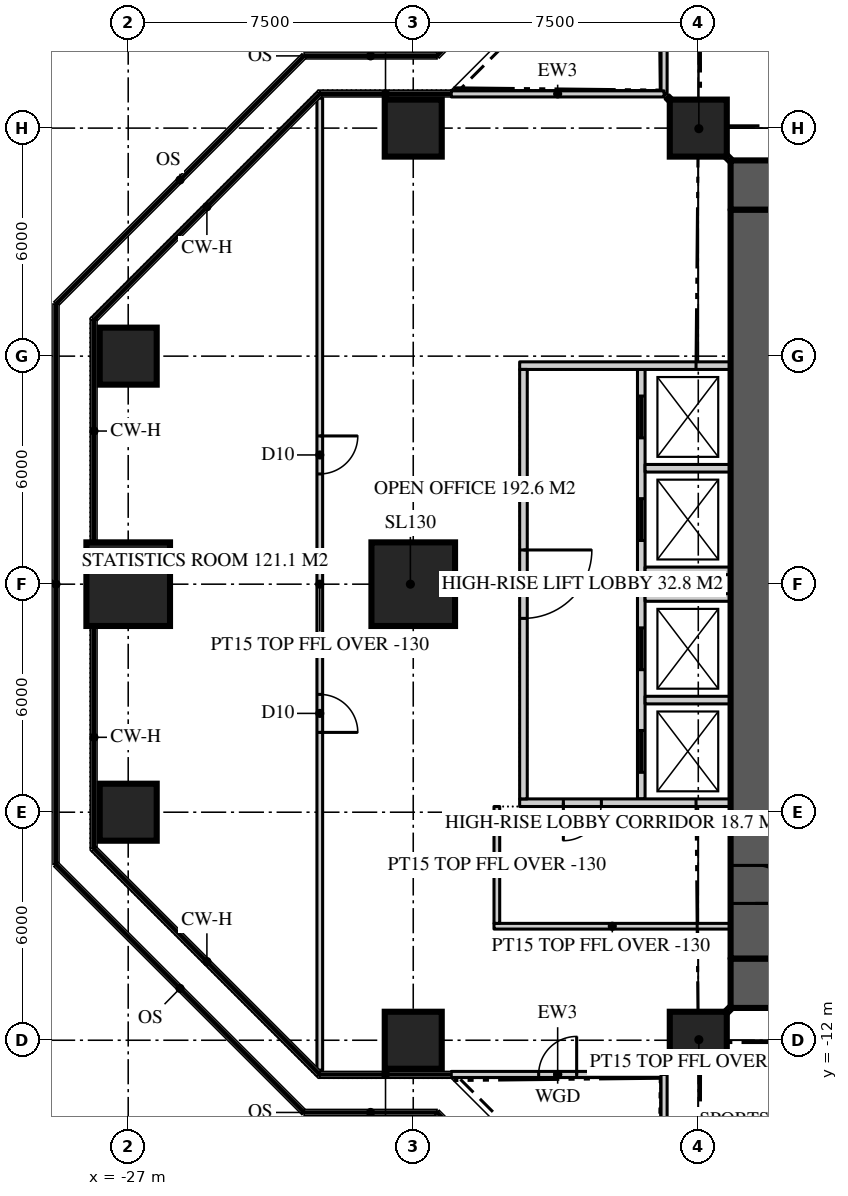
"""IFC4 building model, lengths in metres.
Left out: names, types, materials, properties, quantities, classifications, styles, units other than length and angle.
Written with IfcOpenShell. Run it as: python <this file> out.ifc"""

import sys

from ifc_helpers import new_model, si_unit, direction, frame, frame_2d, origin, origin_2d, place, context, subcontext, project, spatial, rectangle, extrude, element, fill, save


model = new_model("IFC4")
c1 = context("Model", 3, precision=1e-05, world=origin(), true_north=direction((0.0, 1.0)))
c2 = subcontext(c1, "Body", "Model", "MODEL_VIEW")
j1 = project(units=[si_unit("LENGTHUNIT", "METRE"), si_unit("PLANEANGLEUNIT", "RADIAN")], contexts=[c1])
p1 = place(None, origin())
s1 = spatial("IfcSite", under=j1, at=p1, CompositionType="ELEMENT")
p2 = place(p1, origin())
s2 = spatial("IfcBuilding", under=s1, at=p2, CompositionType="ELEMENT")
p3 = place(p2, frame((0.0, 0.0, 220.5)))
s3 = spatial("IfcBuildingStorey", under=s2, at=p3, CompositionType="ELEMENT", Elevation=220.5)
p4 = place(p3, frame((-11.15, 10.5, 0.0), z_axis=(0.0, 0.0, 1.0), x_axis=(1.0, 0.0, 0.0)))
e1 = element("IfcWall", 1, at=p4, inside=s3, PredefinedType="SHEAR", context=c2, shape_type="SweptSolid", body=[
    extrude(rectangle(XDim=22.3, YDim=1.3, at=frame_2d((11.15, 0.0))), origin(), (0.0, 0.0, 1.0), 3.9),
])
p5 = place(p4, frame((4.25, 0.0, 0.0)))
e2 = element("IfcOpeningElement", 2, at=p5, cuts=e1, PredefinedType="OPENING", context=c2, shape_type="SweptSolid", body=[
    extrude(rectangle(XDim=1.8, YDim=2.2, at=frame_2d((0.9, 1.1))), frame((0.0, 0.66, 0.0), z_axis=(0.0, -1.0, 0.0), x_axis=(1.0, 0.0, 0.0)), (0.0, 0.0, 1.0), 1.32),
])
p6 = place(p4, frame((16.25, 0.0, 0.0)))
e3 = element("IfcOpeningElement", 3, at=p6, cuts=e1, PredefinedType="OPENING", context=c2, shape_type="SweptSolid", body=[
    extrude(rectangle(XDim=1.8, YDim=2.2, at=frame_2d((0.9, 1.1))), frame((0.0, 0.66, 0.0), z_axis=(0.0, -1.0, 0.0), x_axis=(1.0, 0.0, 0.0)), (0.0, 0.0, 1.0), 1.32),
])
p7 = place(p3, frame((11.15, -10.5, 0.0), z_axis=(0.0, 0.0, 1.0), x_axis=(-1.0, 0.0, 0.0)))
e4 = element("IfcWall", 4, at=p7, inside=s3, PredefinedType="SHEAR", context=c2, shape_type="SweptSolid", body=[
    extrude(rectangle(XDim=22.3, YDim=1.3, at=frame_2d((11.15, 0.0))), origin(), (0.0, 0.0, 1.0), 3.9),
])
p8 = place(p7, frame((16.25, 0.0, 0.0)))
e5 = element("IfcOpeningElement", 5, at=p8, cuts=e4, PredefinedType="OPENING", context=c2, shape_type="SweptSolid", body=[
    extrude(rectangle(XDim=1.8, YDim=2.2, at=frame_2d((0.9, 1.1))), frame((0.0, 0.66, 0.0), z_axis=(0.0, -1.0, 0.0), x_axis=(1.0, 0.0, 0.0)), (0.0, 0.0, 1.0), 1.32),
])
p9 = place(p7, frame((4.25, 0.0, 0.0)))
e6 = element("IfcOpeningElement", 6, at=p9, cuts=e4, PredefinedType="OPENING", context=c2, shape_type="SweptSolid", body=[
    extrude(rectangle(XDim=1.8, YDim=2.2, at=frame_2d((0.9, 1.1))), frame((0.0, 0.66, 0.0), z_axis=(0.0, -1.0, 0.0), x_axis=(1.0, 0.0, 0.0)), (0.0, 0.0, 1.0), 1.32),
])
p10 = place(p3, frame((-10.5, 9.85, 0.0), z_axis=(0.0, 0.0, 1.0), x_axis=(0.0, -1.0, 0.0)))
e7 = element("IfcWall", 7, at=p10, inside=s3, PredefinedType="SHEAR", context=c2, shape_type="SweptSolid", body=[
    extrude(rectangle(XDim=19.7, YDim=1.3, at=frame_2d((9.85, 0.0))), origin(), (0.0, 0.0, 1.0), 3.9),
])
p11 = place(p10, frame((17.25, 0.0, 0.0)))
e8 = element("IfcOpeningElement", 8, at=p11, cuts=e7, PredefinedType="OPENING", context=c2, shape_type="SweptSolid", body=[
    extrude(rectangle(XDim=1.0, YDim=2.2, at=frame_2d((0.5, 1.1))), frame((0.0, 0.66, 0.0), z_axis=(0.0, -1.0, 0.0), x_axis=(1.0, 0.0, 0.0)), (0.0, 0.0, 1.0), 1.32),
])
for number, where, z_axis, x_axis in (
    (9, (-19.5, -12.0, 0.0), (0.0, 0.0, 1.0), (1.0, 0.0, 0.0)),
    (10, (-12.0, -12.0, 0.0), (0.0, 0.0, 1.0), (1.0, 0.0, 0.0)),
    (11, (-27.0, -6.0, 0.0), (0.0, 0.0, 1.0), (1.0, 0.0, 0.0)),
):
    element("IfcColumn", number, at=place(p3, frame(where, z_axis=z_axis, x_axis=x_axis)), inside=s3, PredefinedType="COLUMN", context=c2, shape_type="SweptSolid", body=[
        extrude(rectangle(XDim=1.5, YDim=1.5, at=origin_2d()), origin(), (0.0, 0.0, 1.0), 3.9),
    ])
for number, where, z_axis, x_axis in (
    (12, (-27.0, 0.0, 0.0), (0.0, 0.0, 1.0), (1.0, 0.0, 0.0)),
    (13, (-19.5, 0.0, 0.0), (0.0, 0.0, 1.0), (1.0, 0.0, 0.0)),
):
    element("IfcColumn", number, at=place(p3, frame(where, z_axis=z_axis, x_axis=x_axis)), inside=s3, PredefinedType="COLUMN", context=c2, shape_type="SweptSolid", body=[
        extrude(rectangle(XDim=2.2, YDim=2.2, at=origin_2d()), origin(), (0.0, 0.0, 1.0), 3.9),
    ])
for number, where, z_axis, x_axis in (
    (14, (-27.0, 6.0, 0.0), (0.0, 0.0, 1.0), (1.0, 0.0, 0.0)),
    (15, (-19.5, 12.0, 0.0), (0.0, 0.0, 1.0), (1.0, 0.0, 0.0)),
    (16, (-12.0, 12.0, 0.0), (0.0, 0.0, 1.0), (1.0, 0.0, 0.0)),
):
    element("IfcColumn", number, at=place(p3, frame(where, z_axis=z_axis, x_axis=x_axis)), inside=s3, PredefinedType="COLUMN", context=c2, shape_type="SweptSolid", body=[
        extrude(rectangle(XDim=1.5, YDim=1.5, at=origin_2d()), origin(), (0.0, 0.0, 1.0), 3.9),
    ])
p12 = place(p3, frame((-12.9, 18.5, 0.0), z_axis=(0.0, 0.0, 1.0), x_axis=(0.0, -1.0, 0.0)))
e17 = element("IfcWall", 17, at=p12, inside=s3, PredefinedType="SOLIDWALL", context=c2, shape_type="SweptSolid", body=[
    extrude(rectangle(XDim=5.6, YDim=0.16, at=frame_2d((2.8, 0.0))), origin(), (0.0, 0.0, 1.0), 3.77),
])
p13 = place(p12, frame((2.3, 0.0, 0.0)))
e18 = element("IfcOpeningElement", 18, at=p13, cuts=e17, PredefinedType="OPENING", context=c2, shape_type="SweptSolid", body=[
    extrude(rectangle(XDim=1.0, YDim=2.2, at=frame_2d((0.5, 1.1))), frame((0.0, 0.09, 0.0), z_axis=(0.0, -1.0, 0.0), x_axis=(1.0, 0.0, 0.0)), (0.0, 0.0, 1.0), 0.18),
])
p14 = place(p3, frame((-12.9, 12.9, 0.0), z_axis=(0.0, 0.0, 1.0), x_axis=(-1.0, 0.0, 0.0)))
e19 = element("IfcWall", 19, at=p14, inside=s3, PredefinedType="SOLIDWALL", context=c2, shape_type="SweptSolid", body=[
    extrude(rectangle(XDim=5.6, YDim=0.16, at=frame_2d((2.8, 0.0))), origin(), (0.0, 0.0, 1.0), 3.77),
])
p15 = place(p3, frame((-18.5, -12.9, 0.0), z_axis=(0.0, 0.0, 1.0), x_axis=(1.0, 0.0, 0.0)))
e20 = element("IfcWall", 20, at=p15, inside=s3, PredefinedType="SOLIDWALL", context=c2, shape_type="SweptSolid", body=[
    extrude(rectangle(XDim=5.6, YDim=0.16, at=frame_2d((2.8, 0.0))), origin(), (0.0, 0.0, 1.0), 3.77),
])
p16 = place(p15, frame((2.3, 0.0, 0.0)))
e21 = element("IfcOpeningElement", 21, at=p16, cuts=e20, PredefinedType="OPENING", context=c2, shape_type="SweptSolid", body=[
    extrude(rectangle(XDim=1.0, YDim=2.2, at=frame_2d((0.5, 1.1))), frame((0.0, 0.09, 0.0), z_axis=(0.0, -1.0, 0.0), x_axis=(1.0, 0.0, 0.0)), (0.0, 0.0, 1.0), 0.18),
])
p17 = place(p3, frame((-12.9, -12.9, 0.0), z_axis=(0.0, 0.0, 1.0), x_axis=(0.0, -1.0, 0.0)))
e22 = element("IfcWall", 22, at=p17, inside=s3, PredefinedType="SOLIDWALL", context=c2, shape_type="SweptSolid", body=[
    extrude(rectangle(XDim=5.6, YDim=0.16, at=frame_2d((2.8, 0.0))), origin(), (0.0, 0.0, 1.0), 3.77),
])
p18 = place(p3, frame((-21.959, 12.786, 0.0), z_axis=(0.0, 0.0, 1.0), x_axis=(0.0, -1.0, 0.0)))
e23 = element("IfcWall", 23, at=p18, inside=s3, PredefinedType="PARTITIONING", context=c2, shape_type="SweptSolid", body=[
    extrude(rectangle(XDim=25.573, YDim=0.15, at=frame_2d((12.786, 0.0))), origin(), (0.0, 0.0, 1.0), 3.77),
])
p19 = place(p18, frame((15.687, 0.0, 0.0)))
e24 = element("IfcOpeningElement", 24, at=p19, cuts=e23, PredefinedType="OPENING", context=c2, shape_type="SweptSolid", body=[
    extrude(rectangle(XDim=1.0, YDim=2.2, at=frame_2d((0.5, 1.1))), frame((0.0, 0.085, 0.0), z_axis=(0.0, -1.0, 0.0), x_axis=(1.0, 0.0, 0.0)), (0.0, 0.0, 1.0), 0.17),
])
p20 = place(p18, frame((8.886, 0.0, 0.0)))
e25 = element("IfcOpeningElement", 25, at=p20, cuts=e23, PredefinedType="OPENING", context=c2, shape_type="SweptSolid", body=[
    extrude(rectangle(XDim=1.0, YDim=2.2, at=frame_2d((0.5, 1.1))), frame((0.0, 0.085, 0.0), z_axis=(0.0, -1.0, 0.0), x_axis=(1.0, 0.0, 0.0)), (0.0, 0.0, 1.0), 0.17),
])
p21 = place(p3, frame((-13.5, 5.65, 0.0), z_axis=(0.0, 0.0, 1.0), x_axis=(0.0, -1.0, 0.0)))
e26 = element("IfcWall", 26, at=p21, inside=s3, PredefinedType="SOLIDWALL", context=c2, shape_type="SweptSolid", body=[
    extrude(rectangle(XDim=11.3, YDim=0.2, at=frame_2d((5.65, 0.0))), origin(), (0.0, 0.0, 1.0), 3.7),
])
p22 = place(p21, frame((0.7, 0.0, 0.0)))
e27 = element("IfcOpeningElement", 27, at=p22, cuts=e26, PredefinedType="OPENING", context=c2, shape_type="SweptSolid", body=[
    extrude(rectangle(XDim=1.1, YDim=2.2, at=frame_2d((0.55, 1.1))), frame((0.0, 0.11, 0.0), z_axis=(0.0, -1.0, 0.0), x_axis=(1.0, 0.0, 0.0)), (0.0, 0.0, 1.0), 0.22),
])
p23 = place(p21, frame((3.4, 0.0, 0.0)))
e28 = element("IfcOpeningElement", 28, at=p23, cuts=e26, PredefinedType="OPENING", context=c2, shape_type="SweptSolid", body=[
    extrude(rectangle(XDim=1.1, YDim=2.2, at=frame_2d((0.55, 1.1))), frame((0.0, 0.11, 0.0), z_axis=(0.0, -1.0, 0.0), x_axis=(1.0, 0.0, 0.0)), (0.0, 0.0, 1.0), 0.22),
])
p24 = place(p21, frame((6.8, 0.0, 0.0)))
e29 = element("IfcOpeningElement", 29, at=p24, cuts=e26, PredefinedType="OPENING", context=c2, shape_type="SweptSolid", body=[
    extrude(rectangle(XDim=1.1, YDim=2.2, at=frame_2d((0.55, 1.1))), frame((0.0, 0.11, 0.0), z_axis=(0.0, -1.0, 0.0), x_axis=(1.0, 0.0, 0.0)), (0.0, 0.0, 1.0), 0.22),
])
p25 = place(p21, frame((9.5, 0.0, 0.0)))
e30 = element("IfcOpeningElement", 30, at=p25, cuts=e26, PredefinedType="OPENING", context=c2, shape_type="SweptSolid", body=[
    extrude(rectangle(XDim=1.1, YDim=2.2, at=frame_2d((0.55, 1.1))), frame((0.0, 0.11, 0.0), z_axis=(0.0, -1.0, 0.0), x_axis=(1.0, 0.0, 0.0)), (0.0, 0.0, 1.0), 0.22),
])
p26 = place(p3, frame((-11.15, 5.75, 0.0), z_axis=(0.0, 0.0, 1.0), x_axis=(-1.0, 0.0, 0.0)))
e31 = element("IfcWall", 31, at=p26, inside=s3, PredefinedType="SOLIDWALL", context=c2, shape_type="SweptSolid", body=[
    extrude(rectangle(XDim=5.55, YDim=0.2, at=frame_2d((2.775, 0.0))), origin(), (0.0, 0.0, 1.0), 3.7),
])
p27 = place(p3, frame((-11.15, -5.75, 0.0), z_axis=(0.0, 0.0, 1.0), x_axis=(-1.0, 0.0, 0.0)))
e32 = element("IfcWall", 32, at=p27, inside=s3, PredefinedType="SOLIDWALL", context=c2, shape_type="SweptSolid", body=[
    extrude(rectangle(XDim=5.55, YDim=0.2, at=frame_2d((2.775, 0.0))), origin(), (0.0, 0.0, 1.0), 3.7),
])
p28 = place(p27, frame((3.4, 0.0, 0.0)))
e33 = element("IfcOpeningElement", 33, at=p28, cuts=e32, PredefinedType="OPENING", context=c2, shape_type="SweptSolid", body=[
    extrude(rectangle(XDim=1.0, YDim=2.2, at=frame_2d((0.5, 1.1))), frame((0.0, 0.11, 0.0), z_axis=(0.0, -1.0, 0.0), x_axis=(1.0, 0.0, 0.0)), (0.0, 0.0, 1.0), 0.22),
])
for number, where, z_axis, x_axis in (
    (34, (-11.15, 3.05, 0.0), (0.0, 0.0, 1.0), (-1.0, 0.0, 0.0)),
    (35, (-11.15, 0.35, 0.0), (0.0, 0.0, 1.0), (-1.0, 0.0, 0.0)),
    (36, (-11.15, -0.35, 0.0), (0.0, 0.0, 1.0), (-1.0, 0.0, 0.0)),
    (37, (-11.15, -3.05, 0.0), (0.0, 0.0, 1.0), (-1.0, 0.0, 0.0)),
):
    element("IfcWall", number, at=place(p3, frame(where, z_axis=z_axis, x_axis=x_axis)), inside=s3, PredefinedType="SOLIDWALL", context=c2, shape_type="SweptSolid", body=[
        extrude(rectangle(XDim=2.25, YDim=0.2, at=frame_2d((1.125, 0.0))), origin(), (0.0, 0.0, 1.0), 3.7),
    ])
p29 = place(p3, frame((-16.6, 5.65, 0.0), z_axis=(0.0, 0.0, 1.0), x_axis=(0.0, -1.0, 0.0)))
e38 = element("IfcWall", 38, at=p29, inside=s3, PredefinedType="SOLIDWALL", context=c2, shape_type="SweptSolid", body=[
    extrude(rectangle(XDim=11.3, YDim=0.2, at=frame_2d((5.65, 0.0))), origin(), (0.0, 0.0, 1.0), 3.18),
])
p30 = place(p29, frame((4.75, 0.0, 0.0)))
e39 = element("IfcOpeningElement", 39, at=p30, cuts=e38, PredefinedType="OPENING", context=c2, shape_type="SweptSolid", body=[
    extrude(rectangle(XDim=1.8, YDim=2.2, at=frame_2d((0.9, 1.1))), frame((0.0, 0.11, 0.0), z_axis=(0.0, -1.0, 0.0), x_axis=(1.0, 0.0, 0.0)), (0.0, 0.0, 1.0), 0.22),
])
for number, where, z_axis, x_axis in (
    (40, (-11.15, 11.15, 0.0), (0.0, 0.0, 1.0), (-0.707, 0.707, 0.0)),
    (41, (-11.15, -11.15, 0.0), (0.0, 0.0, 1.0), (-0.707, -0.707, 0.0)),
):
    element("IfcWall", number, at=place(p3, frame(where, z_axis=z_axis, x_axis=x_axis)), inside=s3, PredefinedType="PARTITIONING", context=c2, shape_type="SweptSolid", body=[
        extrude(rectangle(XDim=2.362, YDim=0.15, at=frame_2d((1.181, 0.0))), origin(), (0.0, 0.0, 1.0), 3.22),
    ])
p31 = place(p3, frame((-11.15, -9.0, 0.0), z_axis=(0.0, 0.0, 1.0), x_axis=(-1.0, 0.0, 0.0)))
e42 = element("IfcWall", 42, at=p31, inside=s3, PredefinedType="PARTITIONING", context=c2, shape_type="SweptSolid", body=[
    extrude(rectangle(XDim=6.225, YDim=0.15, at=frame_2d((3.113, 0.0))), origin(), (0.0, 0.0, 1.0), 3.77),
])
p32 = place(p3, frame((-17.3, -5.85, 0.0), z_axis=(0.0, 0.0, 1.0), x_axis=(0.0, -1.0, 0.0)))
e43 = element("IfcWall", 43, at=p32, inside=s3, PredefinedType="PARTITIONING", context=c2, shape_type="SweptSolid", body=[
    extrude(rectangle(XDim=3.075, YDim=0.15, at=frame_2d((1.538, 0.0))), origin(), (0.0, 0.0, 1.0), 3.77),
])
p33 = place(p16, origin())
e44 = element("IfcDoor", 44, at=p33, inside=s3, OperationType="SINGLE_SWING_RIGHT", PredefinedType="DOOR", context=c2, shape_type="SweptSolid", body=[
    extrude(rectangle(XDim=1.0, YDim=2.2, at=frame_2d((0.5, 1.1))), frame((0.0, 0.025, 0.0), z_axis=(0.0, -1.0, 0.0), x_axis=(1.0, 0.0, 0.0)), (0.0, 0.0, 1.0), 0.05),
])
fill(e21, e44)
p34 = place(p11, origin())
e45 = element("IfcDoor", 45, at=p34, inside=s3, OperationType="SINGLE_SWING_RIGHT", PredefinedType="DOOR", context=c2, shape_type="SweptSolid", body=[
    extrude(rectangle(XDim=1.0, YDim=2.2, at=frame_2d((0.5, 1.1))), frame((0.0, 0.025, 0.0), z_axis=(0.0, -1.0, 0.0), x_axis=(1.0, 0.0, 0.0)), (0.0, 0.0, 1.0), 0.05),
])
fill(e8, e45)
p35 = place(p19, origin())
e46 = element("IfcDoor", 46, at=p35, inside=s3, OperationType="SINGLE_SWING_RIGHT", PredefinedType="DOOR", context=c2, shape_type="SweptSolid", body=[
    extrude(rectangle(XDim=1.0, YDim=2.2, at=frame_2d((0.5, 1.1))), frame((0.0, 0.025, 0.0), z_axis=(0.0, -1.0, 0.0), x_axis=(1.0, 0.0, 0.0)), (0.0, 0.0, 1.0), 0.05),
])
fill(e24, e46)
p36 = place(p20, origin())
e47 = element("IfcDoor", 47, at=p36, inside=s3, OperationType="SINGLE_SWING_LEFT", PredefinedType="DOOR", context=c2, shape_type="SweptSolid", body=[
    extrude(rectangle(XDim=1.0, YDim=2.2, at=frame_2d((0.5, 1.1))), frame((0.0, 0.025, 0.0), z_axis=(0.0, -1.0, 0.0), x_axis=(1.0, 0.0, 0.0)), (0.0, 0.0, 1.0), 0.05),
])
fill(e25, e47)
p37 = place(p30, origin())
e48 = element("IfcDoor", 48, at=p37, inside=s3, OperationType="DOUBLE_DOOR_DOUBLE_SWING", PredefinedType="DOOR", context=c2, shape_type="SweptSolid", body=[
    extrude(rectangle(XDim=1.8, YDim=2.2, at=frame_2d((0.9, 1.1))), frame((0.0, 0.025, 0.0), z_axis=(0.0, -1.0, 0.0), x_axis=(1.0, 0.0, 0.0)), (0.0, 0.0, 1.0), 0.05),
])
fill(e39, e48)
p38 = place(p22, origin())
e49 = element("IfcDoor", 49, at=p38, inside=s3, OperationType="SLIDING_TO_LEFT", PredefinedType="DOOR", context=c2, shape_type="SweptSolid", body=[
    extrude(rectangle(XDim=1.1, YDim=2.2, at=frame_2d((0.55, 1.1))), frame((0.0, 0.025, 0.0), z_axis=(0.0, -1.0, 0.0), x_axis=(1.0, 0.0, 0.0)), (0.0, 0.0, 1.0), 0.05),
])
fill(e27, e49)
p39 = place(p23, origin())
e50 = element("IfcDoor", 50, at=p39, inside=s3, OperationType="SLIDING_TO_LEFT", PredefinedType="DOOR", context=c2, shape_type="SweptSolid", body=[
    extrude(rectangle(XDim=1.1, YDim=2.2, at=frame_2d((0.55, 1.1))), frame((0.0, 0.025, 0.0), z_axis=(0.0, -1.0, 0.0), x_axis=(1.0, 0.0, 0.0)), (0.0, 0.0, 1.0), 0.05),
])
fill(e28, e50)
p40 = place(p24, origin())
e51 = element("IfcDoor", 51, at=p40, inside=s3, OperationType="SLIDING_TO_LEFT", PredefinedType="DOOR", context=c2, shape_type="SweptSolid", body=[
    extrude(rectangle(XDim=1.1, YDim=2.2, at=frame_2d((0.55, 1.1))), frame((0.0, 0.025, 0.0), z_axis=(0.0, -1.0, 0.0), x_axis=(1.0, 0.0, 0.0)), (0.0, 0.0, 1.0), 0.05),
])
fill(e29, e51)
p41 = place(p25, origin())
e52 = element("IfcDoor", 52, at=p41, inside=s3, OperationType="SLIDING_TO_LEFT", PredefinedType="DOOR", context=c2, shape_type="SweptSolid", body=[
    extrude(rectangle(XDim=1.1, YDim=2.2, at=frame_2d((0.55, 1.1))), frame((0.0, 0.025, 0.0), z_axis=(0.0, -1.0, 0.0), x_axis=(1.0, 0.0, 0.0)), (0.0, 0.0, 1.0), 0.05),
])
fill(e30, e52)
p42 = place(p28, origin())
e53 = element("IfcDoor", 53, at=p42, inside=s3, OperationType="SINGLE_SWING_RIGHT", PredefinedType="DOOR", context=c2, shape_type="SweptSolid", body=[
    extrude(rectangle(XDim=1.0, YDim=2.2, at=frame_2d((0.5, 1.1))), frame((0.0, 0.025, 0.0), z_axis=(0.0, -1.0, 0.0), x_axis=(1.0, 0.0, 0.0)), (0.0, 0.0, 1.0), 0.05),
])
fill(e33, e53)
save(model, sys.argv[1])
